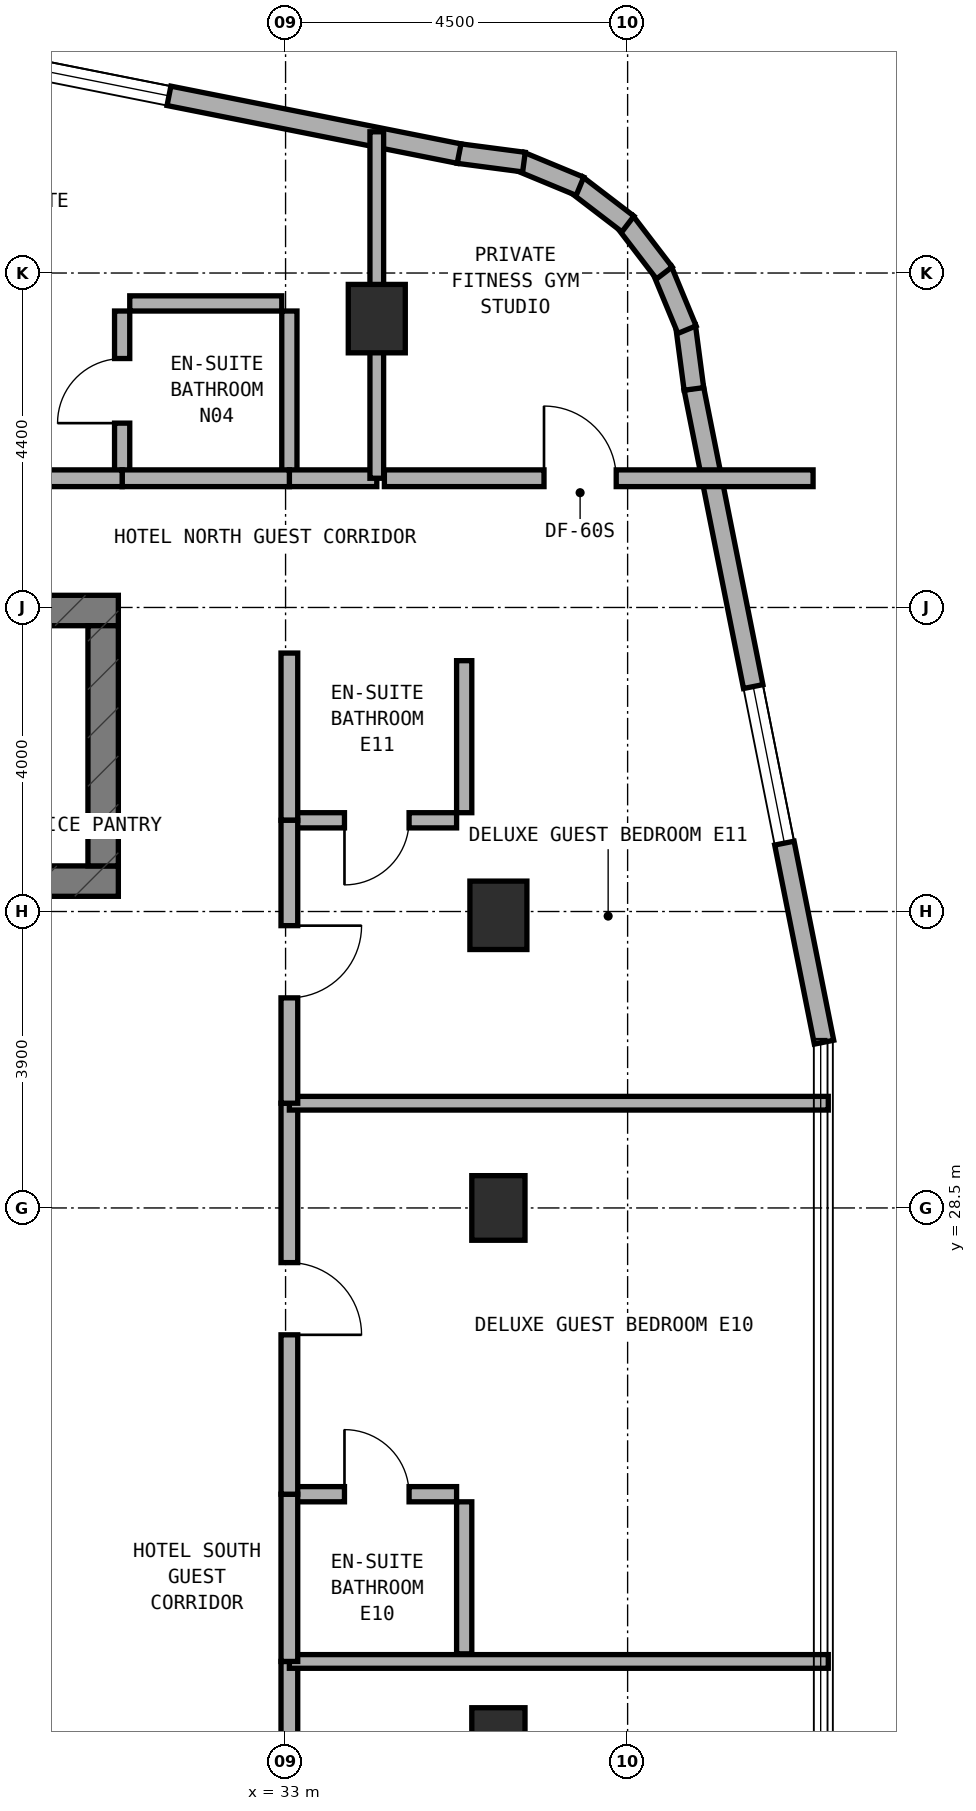
"""IFC4 building model, lengths in metres.
Left out: names, types, materials, properties, quantities, classifications, styles, units other than length and angle.
Written with IfcOpenShell. Run it as: python <this file> out.ifc"""

import sys

from ifc_helpers import new_model, si_unit, direction, frame, frame_2d, origin, origin_2d, place, context, subcontext, project, spatial, rectangle, extrude, element, fill, save


model = new_model("IFC4")
c1 = context("Model", 3, precision=1e-05, world=origin(), true_north=direction((0.0, 1.0)))
c2 = subcontext(c1, "Body", "Model", "MODEL_VIEW")
j1 = project(units=[si_unit("LENGTHUNIT", "METRE"), si_unit("PLANEANGLEUNIT", "RADIAN")], contexts=[c1])
p1 = place(None, origin())
s1 = spatial("IfcSite", under=j1, at=p1, CompositionType="ELEMENT")
p2 = place(p1, origin())
s2 = spatial("IfcBuilding", under=s1, at=p2, CompositionType="ELEMENT")
p3 = place(p2, frame((0.0, 0.0, 220.7)))
s3 = spatial("IfcBuildingStorey", under=s2, at=p3, CompositionType="ELEMENT", Elevation=220.7)
p4 = place(p3, frame((6.4, 32.8, 0.0), z_axis=(0.0, 0.0, 1.0), x_axis=(1.0, 0.0, 0.0)))
e1 = element("IfcWall", 1, at=p4, inside=s3, PredefinedType="SHEAR", context=c2, shape_type="SweptSolid", body=[
    extrude(rectangle(XDim=24.4, YDim=0.4, at=frame_2d((12.2, 0.0))), origin(), (0.0, 0.0, 1.0), 3.6),
])
p5 = place(p4, frame((6.05, 0.0, 0.0)))
e2 = element("IfcOpeningElement", 2, at=p5, cuts=e1, PredefinedType="OPENING", context=c2, shape_type="SweptSolid", body=[
    extrude(rectangle(XDim=1.1, YDim=2.15, at=frame_2d((0.55, 1.075))), frame((0.0, 0.21, 0.0), z_axis=(0.0, -1.0, 0.0), x_axis=(1.0, 0.0, 0.0)), (0.0, 0.0, 1.0), 0.42),
])
p6 = place(p3, frame((6.4, 36.36, 0.0), z_axis=(0.0, 0.0, 1.0), x_axis=(1.0, 0.0, 0.0)))
e3 = element("IfcWall", 3, at=p6, inside=s3, PredefinedType="SHEAR", context=c2, shape_type="SweptSolid", body=[
    extrude(rectangle(XDim=24.4, YDim=0.4, at=frame_2d((12.2, 0.0))), origin(), (0.0, 0.0, 1.0), 3.6),
])
p7 = place(p6, frame((9.15, 0.0, 0.0)))
e4 = element("IfcOpeningElement", 4, at=p7, cuts=e3, PredefinedType="OPENING", context=c2, shape_type="SweptSolid", body=[
    extrude(rectangle(XDim=1.2, YDim=2.15, at=frame_2d((0.6, 1.075))), frame((0.0, 0.21, 0.0), z_axis=(0.0, -1.0, 0.0), x_axis=(1.0, 0.0, 0.0)), (0.0, 0.0, 1.0), 0.42),
])
p8 = place(p6, frame((19.2, 0.0, 0.0)))
e5 = element("IfcOpeningElement", 5, at=p8, cuts=e3, PredefinedType="OPENING", context=c2, shape_type="SweptSolid", body=[
    extrude(rectangle(XDim=0.85, YDim=2.1, at=frame_2d((0.425, 1.05))), frame((0.0, 0.21, 0.0), z_axis=(0.0, -1.0, 0.0), x_axis=(1.0, 0.0, 0.0)), (0.0, 0.0, 1.0), 0.42),
])
p9 = place(p6, frame((16.94, 0.0, 0.0)))
e6 = element("IfcOpeningElement", 6, at=p9, cuts=e3, PredefinedType="OPENING", context=c2, shape_type="SweptSolid", body=[
    extrude(rectangle(XDim=0.85, YDim=2.1, at=frame_2d((0.425, 1.05))), frame((0.0, 0.21, 0.0), z_axis=(0.0, -1.0, 0.0), x_axis=(1.0, 0.0, 0.0)), (0.0, 0.0, 1.0), 0.42),
])
p10 = place(p3, frame((30.6, 33.0, 0.0), z_axis=(0.0, 0.0, 1.0), x_axis=(0.0, 1.0, 0.0)))
e7 = element("IfcWall", 7, at=p10, inside=s3, PredefinedType="SHEAR", context=c2, shape_type="SweptSolid", body=[
    extrude(rectangle(XDim=3.16, YDim=0.4, at=frame_2d((1.58, 0.0))), origin(), (0.0, 0.0, 1.0), 3.6),
])
p11 = place(p3, frame((34.2, 40.2, 0.0), z_axis=(0.0, 0.0, 1.0), x_axis=(1.0, 0.0, 0.0)))
e8 = element("IfcColumn", 8, at=p11, inside=s3, PredefinedType="COLUMN", context=c2, shape_type="SweptSolid", body=[
    extrude(rectangle(XDim=0.75, YDim=0.9, at=origin_2d()), origin(), (0.0, 0.0, 1.0), 3.6),
])
for number, where, z_axis, x_axis in (
    (9, (35.8, 21.5, 0.0), (0.0, 0.0, 1.0), (1.0, 0.0, 0.0)),
    (10, (35.8, 28.5, 0.0), (0.0, 0.0, 1.0), (1.0, 0.0, 0.0)),
):
    element("IfcColumn", number, at=place(p3, frame(where, z_axis=z_axis, x_axis=x_axis)), inside=s3, PredefinedType="COLUMN", context=c2, shape_type="SweptSolid", body=[
        extrude(rectangle(XDim=0.7, YDim=0.85, at=origin_2d()), origin(), (0.0, 0.0, 1.0), 3.6),
    ])
p12 = place(p3, frame((35.8, 32.35, 0.0), z_axis=(0.0, 0.0, 1.0), x_axis=(1.0, 0.0, 0.0)))
e11 = element("IfcColumn", 11, at=p12, inside=s3, PredefinedType="COLUMN", context=c2, shape_type="SweptSolid", body=[
    extrude(rectangle(XDim=0.75, YDim=0.9, at=origin_2d()), origin(), (0.0, 0.0, 1.0), 3.6),
])
p13 = place(p3, frame((40.084, 30.681, 0.0), z_axis=(0.0, 0.0, 1.0), x_axis=(-0.195291715883, 0.980745199176, 0.0)))
e12 = element("IfcWall", 12, at=p13, inside=s3, PredefinedType="STANDARD", context=c2, shape_type="SweptSolid", body=[
    extrude(rectangle(XDim=8.771, YDim=0.26, at=frame_2d((4.385, 0.0))), origin(), (0.0, 0.0, 1.0), 3.32),
])
p14 = place(p13, frame((2.67, 0.0, 0.85)))
e13 = element("IfcOpeningElement", 13, at=p14, cuts=e12, PredefinedType="OPENING", context=c2, shape_type="SweptSolid", body=[
    extrude(rectangle(XDim=2.1, YDim=1.5, at=frame_2d((1.05, 0.75))), frame((0.0, 0.14, 0.0), z_axis=(0.0, -1.0, 0.0), x_axis=(1.0, 0.0, 0.0)), (0.0, 0.0, 1.0), 0.28),
])
p15 = place(p3, frame((38.372, 39.275, 0.0), z_axis=(0.0, 0.0, 1.0), x_axis=(-0.130954667764, 0.9913883573, 0.0)))
e14 = element("IfcWall", 14, at=p15, inside=s3, PredefinedType="STANDARD", context=c2, shape_type="SweptSolid", body=[
    extrude(rectangle(XDim=0.833, YDim=0.26, at=frame_2d((0.417, 0.0))), origin(), (0.0, 0.0, 1.0), 3.32),
])
p16 = place(p3, frame((38.281, 40.055, 0.0), z_axis=(0.0, 0.0, 1.0), x_axis=(-0.382985169477, 0.923754491172, 0.0)))
e15 = element("IfcWall", 15, at=p16, inside=s3, PredefinedType="STANDARD", context=c2, shape_type="SweptSolid", body=[
    extrude(rectangle(XDim=0.851, YDim=0.26, at=frame_2d((0.426, 0.0))), origin(), (0.0, 0.0, 1.0), 3.32),
])
for number, where, z_axis, x_axis in (
    (16, (37.983, 40.801, 0.0), (0.0, 0.0, 1.0), (-0.608, 0.794, 0.0)),
    (17, (37.504, 41.445, 0.0), (0.0, 0.0, 1.0), (-0.794, 0.608, 0.0)),
):
    element("IfcWall", number, at=place(p3, frame(where, z_axis=z_axis, x_axis=x_axis)), inside=s3, PredefinedType="STANDARD", context=c2, shape_type="SweptSolid", body=[
        extrude(rectangle(XDim=0.85, YDim=0.26, at=frame_2d((0.425, 0.0))), origin(), (0.0, 0.0, 1.0), 3.32),
    ])
p17 = place(p3, frame((36.873, 41.941, 0.0), z_axis=(0.0, 0.0, 1.0), x_axis=(-0.923652976167, 0.383229930484, 0.0)))
e18 = element("IfcWall", 18, at=p17, inside=s3, PredefinedType="STANDARD", context=c2, shape_type="SweptSolid", body=[
    extrude(rectangle(XDim=0.851, YDim=0.26, at=frame_2d((0.426, 0.0))), origin(), (0.0, 0.0, 1.0), 3.32),
])
p18 = place(p3, frame((36.136, 42.259, 0.0), z_axis=(0.0, 0.0, 1.0), x_axis=(-0.991493480548, 0.130156359936, 0.0)))
e19 = element("IfcWall", 19, at=p18, inside=s3, PredefinedType="STANDARD", context=c2, shape_type="SweptSolid", body=[
    extrude(rectangle(XDim=0.868, YDim=0.26, at=frame_2d((0.434, 0.0))), origin(), (0.0, 0.0, 1.0), 3.32),
])
p19 = place(p3, frame((35.283, 42.371, 0.0), z_axis=(0.0, 0.0, 1.0), x_axis=(-0.980748582507, 0.1952747242, 0.0)))
e20 = element("IfcWall", 20, at=p19, inside=s3, PredefinedType="STANDARD", context=c2, shape_type="SweptSolid", body=[
    extrude(rectangle(XDim=8.705, YDim=0.26, at=frame_2d((4.353, 0.0))), origin(), (0.0, 0.0, 1.0), 3.32),
])
p20 = place(p19, frame((3.892, 0.0, 0.85)))
e21 = element("IfcOpeningElement", 21, at=p20, cuts=e20, PredefinedType="OPENING", context=c2, shape_type="SweptSolid", body=[
    extrude(rectangle(XDim=2.1, YDim=1.5, at=frame_2d((1.05, 0.75))), frame((0.0, 0.14, 0.0), z_axis=(0.0, -1.0, 0.0), x_axis=(1.0, 0.0, 0.0)), (0.0, 0.0, 1.0), 0.28),
])
p21 = place(p3, frame((30.85, 38.2, 0.0), z_axis=(0.0, 0.0, 1.0), x_axis=(0.0, 1.0, 0.0)))
e22 = element("IfcWall", 22, at=p21, inside=s3, PredefinedType="PLUMBINGWALL", context=c2, shape_type="SweptSolid", body=[
    extrude(rectangle(XDim=2.1, YDim=0.2, at=frame_2d((1.05, 0.0))), origin(), (0.0, 0.0, 1.0), 3.015),
])
p22 = place(p21, frame((0.625, 0.0, 0.0)))
e23 = element("IfcOpeningElement", 23, at=p22, cuts=e22, PredefinedType="OPENING", context=c2, shape_type="SweptSolid", body=[
    extrude(rectangle(XDim=0.85, YDim=2.1, at=frame_2d((0.425, 1.05))), frame((0.0, 0.11, 0.0), z_axis=(0.0, -1.0, 0.0), x_axis=(1.0, 0.0, 0.0)), (0.0, 0.0, 1.0), 0.22),
])
p23 = place(p3, frame((30.95, 40.4, 0.0), z_axis=(0.0, 0.0, 1.0), x_axis=(1.0, 0.0, 0.0)))
e24 = element("IfcWall", 24, at=p23, inside=s3, PredefinedType="PLUMBINGWALL", context=c2, shape_type="SweptSolid", body=[
    extrude(rectangle(XDim=2.0, YDim=0.2, at=frame_2d((1.0, 0.0))), origin(), (0.0, 0.0, 1.0), 3.015),
])
p24 = place(p3, frame((33.05, 38.2, 0.0), z_axis=(0.0, 0.0, 1.0), x_axis=(0.0, 1.0, 0.0)))
e25 = element("IfcWall", 25, at=p24, inside=s3, PredefinedType="PLUMBINGWALL", context=c2, shape_type="SweptSolid", body=[
    extrude(rectangle(XDim=2.1, YDim=0.2, at=frame_2d((1.05, 0.0))), origin(), (0.0, 0.0, 1.0), 3.015),
])
p25 = place(p3, frame((33.05, 38.1, 0.0), z_axis=(0.0, 0.0, 1.0), x_axis=(1.0, 0.0, 0.0)))
e26 = element("IfcWall", 26, at=p25, inside=s3, PredefinedType="SOLIDWALL", context=c2, shape_type="SweptSolid", body=[
    extrude(rectangle(XDim=1.15, YDim=0.22, at=frame_2d((0.575, 0.0))), origin(), (0.0, 0.0, 1.0), 2.695),
])
p26 = place(p3, frame((30.85, 38.1, 0.0), z_axis=(0.0, 0.0, 1.0), x_axis=(1.0, 0.0, 0.0)))
e27 = element("IfcWall", 27, at=p26, inside=s3, PredefinedType="SOLIDWALL", context=c2, shape_type="SweptSolid", body=[
    extrude(rectangle(XDim=2.2, YDim=0.22, at=frame_2d((1.1, 0.0))), origin(), (0.0, 0.0, 1.0), 3.32),
])
p27 = place(p3, frame((25.8, 38.1, 0.0), z_axis=(0.0, 0.0, 1.0), x_axis=(1.0, 0.0, 0.0)))
e28 = element("IfcWall", 28, at=p27, inside=s3, PredefinedType="SOLIDWALL", context=c2, shape_type="SweptSolid", body=[
    extrude(rectangle(XDim=5.05, YDim=0.22, at=frame_2d((2.525, 0.0))), origin(), (0.0, 0.0, 1.0), 2.695),
])
p28 = place(p27, frame((2.05, 0.0, 0.0)))
e29 = element("IfcOpeningElement", 29, at=p28, cuts=e28, PredefinedType="OPENING", context=c2, shape_type="SweptSolid", body=[
    extrude(rectangle(XDim=0.95, YDim=2.1, at=frame_2d((0.475, 1.05))), frame((0.0, 0.12, 0.0), z_axis=(0.0, -1.0, 0.0), x_axis=(1.0, 0.0, 0.0)), (0.0, 0.0, 1.0), 0.24),
])
p29 = place(p3, frame((34.2, 38.1, 0.0), z_axis=(0.0, 0.0, 1.0), x_axis=(0.0, 1.0, 0.0)))
e30 = element("IfcWall", 30, at=p29, inside=s3, PredefinedType="SOLIDWALL", context=c2, shape_type="SweptSolid", body=[
    extrude(rectangle(XDim=4.558, YDim=0.18, at=frame_2d((2.279, 0.0))), origin(), (0.0, 0.0, 1.0), 2.695),
])
p30 = place(p3, frame((34.3, 38.1, 0.0), z_axis=(0.0, 0.0, 1.0), x_axis=(1.0, 0.0, 0.0)))
e31 = element("IfcWall", 31, at=p30, inside=s3, PredefinedType="SOLIDWALL", context=c2, shape_type="SweptSolid", body=[
    extrude(rectangle(XDim=5.64, YDim=0.22, at=frame_2d((2.82, 0.0))), origin(), (0.0, 0.0, 1.0), 3.015),
])
p31 = place(p30, frame((2.1, 0.0, 0.0)))
e32 = element("IfcOpeningElement", 32, at=p31, cuts=e31, PredefinedType="OPENING", context=c2, shape_type="SweptSolid", body=[
    extrude(rectangle(XDim=0.95, YDim=2.1, at=frame_2d((0.475, 1.05))), frame((0.0, 0.12, 0.0), z_axis=(0.0, -1.0, 0.0), x_axis=(1.0, 0.0, 0.0)), (0.0, 0.0, 1.0), 0.24),
])
p32 = place(p3, frame((33.05, 16.4, 0.0), z_axis=(0.0, 0.0, 1.0), x_axis=(0.0, 1.0, 0.0)))
e33 = element("IfcWall", 33, at=p32, inside=s3, PredefinedType="SOLIDWALL", context=c2, shape_type="SweptSolid", body=[
    extrude(rectangle(XDim=6.134, YDim=0.22, at=frame_2d((3.067, 0.0))), origin(), (0.0, 0.0, 1.0), 2.695),
])
p33 = place(p32, frame((2.592, 0.0, 0.0)))
e34 = element("IfcOpeningElement", 34, at=p33, cuts=e33, PredefinedType="OPENING", context=c2, shape_type="SweptSolid", body=[
    extrude(rectangle(XDim=0.95, YDim=2.1, at=frame_2d((0.475, 1.05))), frame((0.0, 0.12, 0.0), z_axis=(0.0, -1.0, 0.0), x_axis=(1.0, 0.0, 0.0)), (0.0, 0.0, 1.0), 0.24),
])
p34 = place(p3, frame((33.05, 22.534, 0.0), z_axis=(0.0, 0.0, 1.0), x_axis=(1.0, 0.0, 0.0)))
e35 = element("IfcWall", 35, at=p34, inside=s3, PredefinedType="SOLIDWALL", context=c2, shape_type="SweptSolid", body=[
    extrude(rectangle(XDim=7.09, YDim=0.18, at=frame_2d((3.545, 0.0))), origin(), (0.0, 0.0, 1.0), 3.015),
])
p35 = place(p3, frame((33.15, 24.734, 0.0), z_axis=(0.0, 0.0, 1.0), x_axis=(1.0, 0.0, 0.0)))
e36 = element("IfcWall", 36, at=p35, inside=s3, PredefinedType="PLUMBINGWALL", context=c2, shape_type="SweptSolid", body=[
    extrude(rectangle(XDim=2.1, YDim=0.2, at=frame_2d((1.05, 0.0))), origin(), (0.0, 0.0, 1.0), 3.32),
])
p36 = place(p35, frame((0.625, 0.0, 0.0)))
e37 = element("IfcOpeningElement", 37, at=p36, cuts=e36, PredefinedType="OPENING", context=c2, shape_type="SweptSolid", body=[
    extrude(rectangle(XDim=0.85, YDim=2.1, at=frame_2d((0.425, 1.05))), frame((0.0, 0.11, 0.0), z_axis=(0.0, -1.0, 0.0), x_axis=(1.0, 0.0, 0.0)), (0.0, 0.0, 1.0), 0.22),
])
p37 = place(p3, frame((35.35, 22.634, 0.0), z_axis=(0.0, 0.0, 1.0), x_axis=(0.0, 1.0, 0.0)))
e38 = element("IfcWall", 38, at=p37, inside=s3, PredefinedType="PLUMBINGWALL", context=c2, shape_type="SweptSolid", body=[
    extrude(rectangle(XDim=2.0, YDim=0.2, at=frame_2d((1.0, 0.0))), origin(), (0.0, 0.0, 1.0), 3.32),
])
p38 = place(p3, frame((33.05, 22.534, 0.0), z_axis=(0.0, 0.0, 1.0), x_axis=(0.0, 1.0, 0.0)))
e39 = element("IfcWall", 39, at=p38, inside=s3, PredefinedType="SOLIDWALL", context=c2, shape_type="SweptSolid", body=[
    extrude(rectangle(XDim=2.2, YDim=0.22, at=frame_2d((1.1, 0.0))), origin(), (0.0, 0.0, 1.0), 3.32),
])
p39 = place(p3, frame((33.05, 24.734, 0.0), z_axis=(0.0, 0.0, 1.0), x_axis=(0.0, 1.0, 0.0)))
e40 = element("IfcWall", 40, at=p39, inside=s3, PredefinedType="SOLIDWALL", context=c2, shape_type="SweptSolid", body=[
    extrude(rectangle(XDim=5.144, YDim=0.22, at=frame_2d((2.572, 0.0))), origin(), (0.0, 0.0, 1.0), 2.695),
])
p40 = place(p39, frame((2.097, 0.0, 0.0)))
e41 = element("IfcOpeningElement", 41, at=p40, cuts=e40, PredefinedType="OPENING", context=c2, shape_type="SweptSolid", body=[
    extrude(rectangle(XDim=0.95, YDim=2.1, at=frame_2d((0.475, 1.05))), frame((0.0, 0.12, 0.0), z_axis=(0.0, -1.0, 0.0), x_axis=(1.0, 0.0, 0.0)), (0.0, 0.0, 1.0), 0.24),
])
p41 = place(p3, frame((33.05, 29.878, 0.0), z_axis=(0.0, 0.0, 1.0), x_axis=(1.0, 0.0, 0.0)))
e42 = element("IfcWall", 42, at=p41, inside=s3, PredefinedType="SOLIDWALL", context=c2, shape_type="SweptSolid", body=[
    extrude(rectangle(XDim=7.09, YDim=0.18, at=frame_2d((3.545, 0.0))), origin(), (0.0, 0.0, 1.0), 3.015),
])
p42 = place(p3, frame((33.15, 33.6, 0.0), z_axis=(0.0, 0.0, 1.0), x_axis=(1.0, 0.0, 0.0)))
e43 = element("IfcWall", 43, at=p42, inside=s3, PredefinedType="PLUMBINGWALL", context=c2, shape_type="SweptSolid", body=[
    extrude(rectangle(XDim=2.1, YDim=0.2, at=frame_2d((1.05, 0.0))), origin(), (0.0, 0.0, 1.0), 3.32),
])
p43 = place(p42, frame((0.625, 0.0, 0.0)))
e44 = element("IfcOpeningElement", 44, at=p43, cuts=e43, PredefinedType="OPENING", context=c2, shape_type="SweptSolid", body=[
    extrude(rectangle(XDim=0.85, YDim=2.1, at=frame_2d((0.425, 1.05))), frame((0.0, 0.11, 0.0), z_axis=(0.0, -1.0, 0.0), x_axis=(1.0, 0.0, 0.0)), (0.0, 0.0, 1.0), 0.22),
])
p44 = place(p3, frame((35.35, 33.7, 0.0), z_axis=(0.0, 0.0, 1.0), x_axis=(0.0, 1.0, 0.0)))
e45 = element("IfcWall", 45, at=p44, inside=s3, PredefinedType="PLUMBINGWALL", context=c2, shape_type="SweptSolid", body=[
    extrude(rectangle(XDim=2.0, YDim=0.2, at=frame_2d((1.0, 0.0))), origin(), (0.0, 0.0, 1.0), 3.015),
])
p45 = place(p3, frame((33.05, 33.6, 0.0), z_axis=(0.0, 0.0, 1.0), x_axis=(0.0, 1.0, 0.0)))
e46 = element("IfcWall", 46, at=p45, inside=s3, PredefinedType="SOLIDWALL", context=c2, shape_type="SweptSolid", body=[
    extrude(rectangle(XDim=2.2, YDim=0.22, at=frame_2d((1.1, 0.0))), origin(), (0.0, 0.0, 1.0), 3.32),
])
p46 = place(p3, frame((33.05, 29.878, 0.0), z_axis=(0.0, 0.0, 1.0), x_axis=(0.0, 1.0, 0.0)))
e47 = element("IfcWall", 47, at=p46, inside=s3, PredefinedType="SOLIDWALL", context=c2, shape_type="SweptSolid", body=[
    extrude(rectangle(XDim=3.722, YDim=0.22, at=frame_2d((1.861, 0.0))), origin(), (0.0, 0.0, 1.0), 2.695),
])
p47 = place(p46, frame((1.386, 0.0, 0.0)))
e48 = element("IfcOpeningElement", 48, at=p47, cuts=e47, PredefinedType="OPENING", context=c2, shape_type="SweptSolid", body=[
    extrude(rectangle(XDim=0.95, YDim=2.1, at=frame_2d((0.475, 1.05))), frame((0.0, 0.12, 0.0), z_axis=(0.0, -1.0, 0.0), x_axis=(1.0, 0.0, 0.0)), (0.0, 0.0, 1.0), 0.24),
])
p48 = place(p14, origin())
e49 = element("IfcWindow", 49, at=p48, inside=s3, PartitioningType="SINGLE_PANEL", PredefinedType="WINDOW", context=c2, shape_type="SweptSolid", body=[
    extrude(rectangle(XDim=2.1, YDim=1.5, at=frame_2d((1.05, 0.75))), frame((0.0, 0.03, 0.0), z_axis=(0.0, -1.0, 0.0), x_axis=(1.0, 0.0, 0.0)), (0.0, 0.0, 1.0), 0.06),
])
fill(e13, e49)
p49 = place(p20, origin())
e50 = element("IfcWindow", 50, at=p49, inside=s3, PartitioningType="SINGLE_PANEL", PredefinedType="WINDOW", context=c2, shape_type="SweptSolid", body=[
    extrude(rectangle(XDim=2.1, YDim=1.5, at=frame_2d((1.05, 0.75))), frame((0.0, 0.03, 0.0), z_axis=(0.0, -1.0, 0.0), x_axis=(1.0, 0.0, 0.0)), (0.0, 0.0, 1.0), 0.06),
])
fill(e21, e50)
p50 = place(p22, origin())
e51 = element("IfcDoor", 51, at=p50, inside=s3, OperationType="SINGLE_SWING_LEFT", PredefinedType="DOOR", context=c2, shape_type="SweptSolid", body=[
    extrude(rectangle(XDim=0.85, YDim=2.1, at=frame_2d((0.425, 1.05))), frame((0.0, 0.025, 0.0), z_axis=(0.0, -1.0, 0.0), x_axis=(1.0, 0.0, 0.0)), (0.0, 0.0, 1.0), 0.05),
])
fill(e23, e51)
p51 = place(p31, origin())
e52 = element("IfcDoor", 52, at=p51, inside=s3, OperationType="SINGLE_SWING_LEFT", PredefinedType="DOOR", context=c2, shape_type="SweptSolid", body=[
    extrude(rectangle(XDim=0.95, YDim=2.1, at=frame_2d((0.475, 1.05))), frame((0.0, 0.025, 0.0), z_axis=(0.0, -1.0, 0.0), x_axis=(1.0, 0.0, 0.0)), (0.0, 0.0, 1.0), 0.05),
])
fill(e32, e52)
p52 = place(p36, origin())
e53 = element("IfcDoor", 53, at=p52, inside=s3, OperationType="SINGLE_SWING_LEFT", PredefinedType="DOOR", context=c2, shape_type="SweptSolid", body=[
    extrude(rectangle(XDim=0.85, YDim=2.1, at=frame_2d((0.425, 1.05))), frame((0.0, 0.025, 0.0), z_axis=(0.0, -1.0, 0.0), x_axis=(1.0, 0.0, 0.0)), (0.0, 0.0, 1.0), 0.05),
])
fill(e37, e53)
p53 = place(p40, frame((0.95, 0.0, 0.0), z_axis=(0.0, 0.0, 1.0), x_axis=(-1.0, 0.0, 0.0)))
e54 = element("IfcDoor", 54, at=p53, inside=s3, OperationType="SINGLE_SWING_RIGHT", PredefinedType="DOOR", context=c2, shape_type="SweptSolid", body=[
    extrude(rectangle(XDim=0.95, YDim=2.1, at=frame_2d((0.475, 1.05))), frame((0.0, 0.025, 0.0), z_axis=(0.0, -1.0, 0.0), x_axis=(1.0, 0.0, 0.0)), (0.0, 0.0, 1.0), 0.05),
])
fill(e41, e54)
p54 = place(p43, frame((0.85, 0.0, 0.0), z_axis=(0.0, 0.0, 1.0), x_axis=(-1.0, 0.0, 0.0)))
e55 = element("IfcDoor", 55, at=p54, inside=s3, OperationType="SINGLE_SWING_RIGHT", PredefinedType="DOOR", context=c2, shape_type="SweptSolid", body=[
    extrude(rectangle(XDim=0.85, YDim=2.1, at=frame_2d((0.425, 1.05))), frame((0.0, 0.025, 0.0), z_axis=(0.0, -1.0, 0.0), x_axis=(1.0, 0.0, 0.0)), (0.0, 0.0, 1.0), 0.05),
])
fill(e44, e55)
p55 = place(p47, frame((0.95, 0.0, 0.0), z_axis=(0.0, 0.0, 1.0), x_axis=(-1.0, 0.0, 0.0)))
e56 = element("IfcDoor", 56, at=p55, inside=s3, OperationType="SINGLE_SWING_LEFT", PredefinedType="DOOR", context=c2, shape_type="SweptSolid", body=[
    extrude(rectangle(XDim=0.95, YDim=2.1, at=frame_2d((0.475, 1.05))), frame((0.0, 0.025, 0.0), z_axis=(0.0, -1.0, 0.0), x_axis=(1.0, 0.0, 0.0)), (0.0, 0.0, 1.0), 0.05),
])
fill(e48, e56)
save(model, sys.argv[1])
